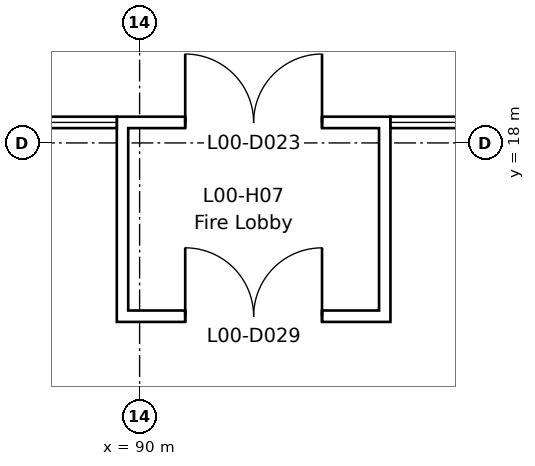
"""IFC4 building model, lengths in metres.
Left out: names, types, materials, properties, quantities, classifications, styles, units other than length and angle.
Written with IfcOpenShell. Run it as: python <this file> out.ifc"""

import sys

from ifc_helpers import new_model, si_unit, direction, frame, frame_2d, origin, place, context, subcontext, project, spatial, rectangle, extrude, element, fill, save


model = new_model("IFC4")
c1 = context("Model", 3, precision=1e-05, world=origin(), true_north=direction((0.0, 1.0)))
c2 = subcontext(c1, "Body", "Model", "MODEL_VIEW")
j1 = project(units=[si_unit("LENGTHUNIT", "METRE"), si_unit("PLANEANGLEUNIT", "RADIAN")], contexts=[c1])
p1 = place(None, origin())
s1 = spatial("IfcSite", under=j1, at=p1, CompositionType="ELEMENT")
p2 = place(p1, origin())
s2 = spatial("IfcBuilding", under=s1, at=p2, CompositionType="ELEMENT")
p3 = place(p2, origin())
s3 = spatial("IfcBuildingStorey", under=s2, at=p3, CompositionType="ELEMENT", Elevation=0.0)
p4 = place(p3, frame((89.7, 18.27, 0.0), z_axis=(0.0, 0.0, 1.0), x_axis=(1.0, 0.0, 0.0)))
e1 = element("IfcWall", 1, at=p4, inside=s3, PredefinedType="STANDARD", context=c2, shape_type="SweptSolid", body=[
    extrude(rectangle(XDim=3.6, YDim=0.15, at=frame_2d((1.8, 0.0))), origin(), (0.0, 0.0, 1.0), 4.8),
])
p5 = place(p4, frame((0.9, 0.0, 0.0)))
e2 = element("IfcOpeningElement", 2, at=p5, cuts=e1, PredefinedType="OPENING", context=c2, shape_type="SweptSolid", body=[
    extrude(rectangle(XDim=1.8, YDim=2.4, at=frame_2d((0.9, 1.2))), frame((0.0, 0.085, 0.0), z_axis=(0.0, -1.0, 0.0), x_axis=(1.0, 0.0, 0.0)), (0.0, 0.0, 1.0), 0.17),
])
for number, where, z_axis, x_axis in (
    (3, (89.775, 15.795, 0.0), (0.0, 0.0, 1.0), (0.0, 1.0, 0.0)),
    (4, (93.225, 15.795, 0.0), (0.0, 0.0, 1.0), (0.0, 1.0, 0.0)),
):
    element("IfcWall", number, at=place(p3, frame(where, z_axis=z_axis, x_axis=x_axis)), inside=s3, PredefinedType="STANDARD", context=c2, shape_type="SweptSolid", body=[
        extrude(rectangle(XDim=2.4, YDim=0.15, at=frame_2d((1.2, 0.0))), origin(), (0.0, 0.0, 1.0), 3.0),
    ])
p6 = place(p3, frame((89.7, 15.72, 0.0), z_axis=(0.0, 0.0, 1.0), x_axis=(1.0, 0.0, 0.0)))
e5 = element("IfcWall", 5, at=p6, inside=s3, PredefinedType="STANDARD", context=c2, shape_type="SweptSolid", body=[
    extrude(rectangle(XDim=3.6, YDim=0.15, at=frame_2d((1.8, 0.0))), origin(), (0.0, 0.0, 1.0), 3.0),
])
p7 = place(p6, frame((0.9, 0.0, 0.0)))
e6 = element("IfcOpeningElement", 6, at=p7, cuts=e5, PredefinedType="OPENING", context=c2, shape_type="SweptSolid", body=[
    extrude(rectangle(XDim=1.8, YDim=2.4, at=frame_2d((0.9, 1.2))), frame((0.0, 0.085, 0.0), z_axis=(0.0, -1.0, 0.0), x_axis=(1.0, 0.0, 0.0)), (0.0, 0.0, 1.0), 0.17),
])
p8 = place(p5, origin())
e7 = element("IfcDoor", 7, at=p8, inside=s3, OperationType="DOUBLE_DOOR_SINGLE_SWING", PredefinedType="DOOR", context=c2, shape_type="SweptSolid", body=[
    extrude(rectangle(XDim=1.8, YDim=2.4, at=frame_2d((0.9, 1.2))), frame((0.0, 0.025, 0.0), z_axis=(0.0, -1.0, 0.0), x_axis=(1.0, 0.0, 0.0)), (0.0, 0.0, 1.0), 0.05),
])
fill(e2, e7)
p9 = place(p7, origin())
e8 = element("IfcDoor", 8, at=p9, inside=s3, OperationType="DOUBLE_DOOR_SINGLE_SWING", PredefinedType="DOOR", context=c2, shape_type="SweptSolid", body=[
    extrude(rectangle(XDim=1.8, YDim=2.4, at=frame_2d((0.9, 1.2))), frame((0.0, 0.025, 0.0), z_axis=(0.0, -1.0, 0.0), x_axis=(1.0, 0.0, 0.0)), (0.0, 0.0, 1.0), 0.05),
])
fill(e6, e8)
save(model, sys.argv[1])
